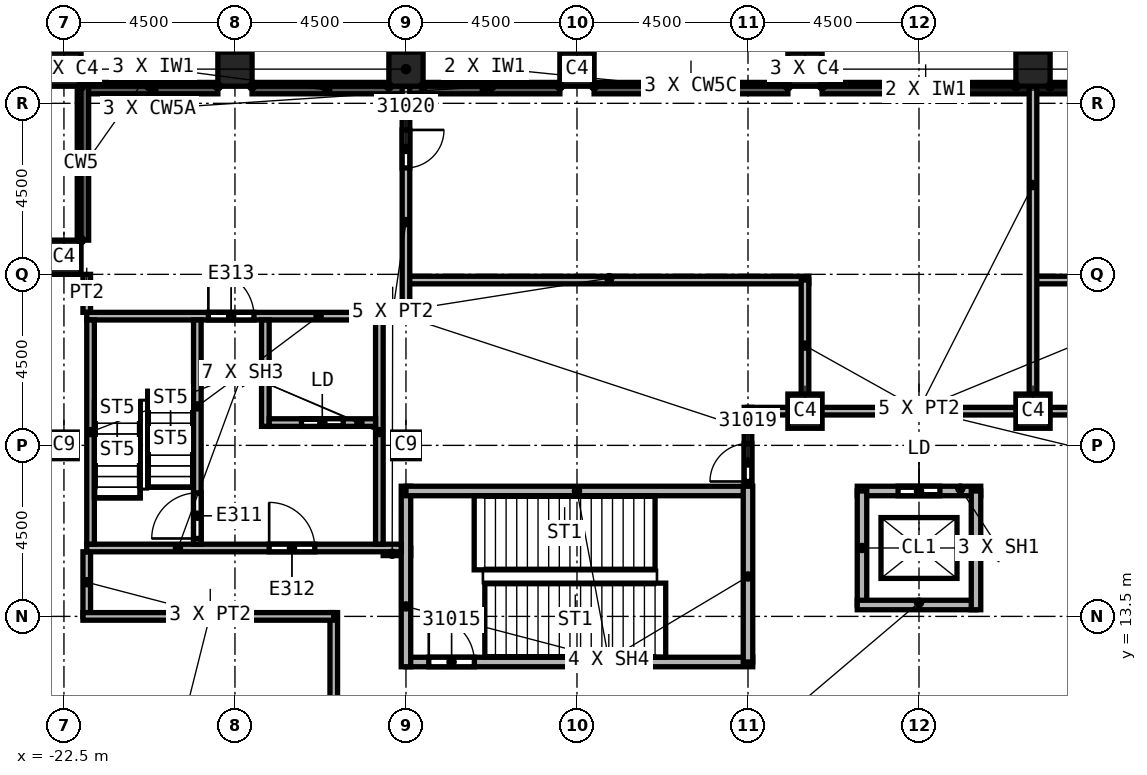
"""IFC4 building model, lengths in metres.
Left out: names, types, materials, properties, quantities, classifications, styles, units other than length and angle.
Written with IfcOpenShell. Run it as: python <this file> out.ifc"""

import sys

from ifc_helpers import new_model, si_unit, direction, frame, frame_2d, origin, origin_2d, place, context, subcontext, project, spatial, rectangle, extrude, element, fill, save


model = new_model("IFC4")
c1 = context("Model", 3, precision=1e-05, world=origin(), true_north=direction((0.0, 1.0)))
c2 = subcontext(c1, "Body", "Model", "MODEL_VIEW")
j1 = project(units=[si_unit("LENGTHUNIT", "METRE"), si_unit("PLANEANGLEUNIT", "RADIAN")], contexts=[c1])
p1 = place(None, origin())
s1 = spatial("IfcSite", under=j1, at=p1, CompositionType="ELEMENT")
p2 = place(p1, origin())
s2 = spatial("IfcBuilding", under=s1, at=p2, CompositionType="ELEMENT")
p3 = place(p2, frame((0.0, 0.0, 350.0)))
s3 = spatial("IfcBuildingStorey", under=s2, at=p3, CompositionType="ELEMENT", Elevation=350.0)
for number, where, z_axis, x_axis in (
    (1, (-13.5, 18.0, 0.0), (0.0, 0.0, 1.0), (1.0, 0.0, 0.0)),
    (2, (-22.5, 18.0, 0.0), (0.0, 0.0, 1.0), (1.0, 0.0, 0.0)),
):
    element("IfcColumn", number, at=place(p3, frame(where, z_axis=z_axis, x_axis=x_axis)), inside=s3, PredefinedType="COLUMN", context=c2, shape_type="SweptSolid", body=[
        extrude(rectangle(XDim=0.7, YDim=0.7, at=origin_2d()), origin(), (0.0, 0.0, 1.0), 5.6),
    ])
for number, where, z_axis, x_axis in (
    (3, (3.0, 27.9, 0.0), (0.0, 0.0, 1.0), (1.0, 0.0, 0.0)),
    (4, (-3.0, 27.9, 0.0), (0.0, 0.0, 1.0), (1.0, 0.0, 0.0)),
    (5, (-9.0, 27.9, 0.0), (0.0, 0.0, 1.0), (1.0, 0.0, 0.0)),
    (6, (-13.5, 27.9, 0.0), (0.0, 0.0, 1.0), (1.0, 0.0, 0.0)),
    (7, (-18.0, 27.9, 0.0), (0.0, 0.0, 1.0), (1.0, 0.0, 0.0)),
    (8, (-22.5, 27.9, 0.0), (0.0, 0.0, 1.0), (1.0, 0.0, 0.0)),
    (9, (3.0, 18.9, 0.0), (0.0, 0.0, 1.0), (1.0, 0.0, 0.0)),
    (10, (-3.0, 18.9, 0.0), (0.0, 0.0, 1.0), (1.0, 0.0, 0.0)),
    (11, (-22.5, 22.95, 0.0), (0.0, 0.0, 1.0), (1.0, 0.0, 0.0)),
):
    element("IfcColumn", number, at=place(p3, frame(where, z_axis=z_axis, x_axis=x_axis)), inside=s3, PredefinedType="COLUMN", context=c2, shape_type="SweptSolid", body=[
        extrude(rectangle(XDim=0.9, YDim=0.9, at=origin_2d()), origin(), (0.0, 0.0, 1.0), 5.6),
    ])
for number, where, z_axis, x_axis in (
    (12, (8.55, 27.4, 0.0), (0.0, 0.0, 1.0), (-1.0, 0.0, 0.0)),
    (13, (2.95, 27.4, 0.0), (0.0, 0.0, 1.0), (-1.0, 0.0, 0.0)),
):
    element("IfcWall", number, at=place(p3, frame(where, z_axis=z_axis, x_axis=x_axis)), inside=s3, PredefinedType="SOLIDWALL", context=c2, shape_type="SweptSolid", body=[
        extrude(rectangle(XDim=5.5, YDim=0.3, at=frame_2d((2.75, 0.0))), origin(), (0.0, 0.0, 1.0), 1.1),
    ])
p4 = place(p3, frame((-3.45, 27.4, 0.0), z_axis=(0.0, 0.0, 1.0), x_axis=(-1.0, 0.0, 0.0)))
e14 = element("IfcWall", 14, at=p4, inside=s3, PredefinedType="SOLIDWALL", context=c2, shape_type="SweptSolid", body=[
    extrude(rectangle(XDim=5.1, YDim=0.3, at=frame_2d((2.55, 0.0))), origin(), (0.0, 0.0, 1.0), 1.1),
])
for number, where, z_axis, x_axis in (
    (15, (-9.45, 27.4, 0.0), (0.0, 0.0, 1.0), (-1.0, 0.0, 0.0)),
    (16, (-13.55, 27.4, 0.0), (0.0, 0.0, 1.0), (-1.0, 0.0, 0.0)),
):
    element("IfcWall", number, at=place(p3, frame(where, z_axis=z_axis, x_axis=x_axis)), inside=s3, PredefinedType="SOLIDWALL", context=c2, shape_type="SweptSolid", body=[
        extrude(rectangle(XDim=4.0, YDim=0.3, at=frame_2d((2.0, 0.0))), origin(), (0.0, 0.0, 1.0), 1.1),
    ])
p5 = place(p3, frame((-18.45, 27.4, 0.0), z_axis=(0.0, 0.0, 1.0), x_axis=(-1.0, 0.0, 0.0)))
e17 = element("IfcWall", 17, at=p5, inside=s3, PredefinedType="SOLIDWALL", context=c2, shape_type="SweptSolid", body=[
    extrude(rectangle(XDim=3.6, YDim=0.3, at=frame_2d((1.8, 0.0))), origin(), (0.0, 0.0, 1.0), 1.1),
])
p6 = place(p3, frame((-22.0, 27.45, 0.0), z_axis=(0.0, 0.0, 1.0), x_axis=(0.0, -1.0, 0.0)))
e18 = element("IfcWall", 18, at=p6, inside=s3, PredefinedType="SOLIDWALL", context=c2, shape_type="SweptSolid", body=[
    extrude(rectangle(XDim=4.05, YDim=0.3, at=frame_2d((2.025, 0.0))), origin(), (0.0, 0.0, 1.0), 1.1),
])
p7 = place(p3, frame((-21.9, 13.5, 0.0), z_axis=(0.0, 0.0, 1.0), x_axis=(0.0, 1.0, 0.0)))
e19 = element("IfcWall", 19, at=p7, inside=s3, PredefinedType="PARTITIONING", context=c2, shape_type="SweptSolid", body=[
    extrude(rectangle(XDim=1.7, YDim=0.2, at=frame_2d((0.85, 0.0))), origin(), (0.0, 0.0, 1.0), 5.6),
])
p8 = place(p3, frame((-21.9, 21.5, 0.0), z_axis=(0.0, 0.0, 1.0), x_axis=(0.0, 1.0, 0.0)))
e20 = element("IfcWall", 20, at=p8, inside=s3, PredefinedType="PARTITIONING", context=c2, shape_type="SweptSolid", body=[
    extrude(rectangle(XDim=1.0, YDim=0.2, at=frame_2d((0.5, 0.0))), origin(), (0.0, 0.0, 1.0), 5.6),
])
p9 = place(p3, frame((-15.4, -27.25, 0.0), z_axis=(0.0, 0.0, 1.0), x_axis=(0.0, 1.0, 0.0)))
e21 = element("IfcWall", 21, at=p9, inside=s3, PredefinedType="PARTITIONING", context=c2, shape_type="SweptSolid", body=[
    extrude(rectangle(XDim=40.85, YDim=0.2, at=frame_2d((20.425, 0.0))), origin(), (0.0, 0.0, 1.0), 5.6),
])
p10 = place(p9, frame((29.05, 0.0, 0.0)))
e22 = element("IfcOpeningElement", 22, at=p10, cuts=e21, PredefinedType="OPENING", context=c2, shape_type="SweptSolid", body=[
    extrude(rectangle(XDim=1.0, YDim=2.1, at=frame_2d((0.5, 1.05))), frame((0.0, 0.1, 0.0), z_axis=(0.0, -1.0, 0.0), x_axis=(1.0, 0.0, 0.0)), (0.0, 0.0, 1.0), 0.2),
])
p11 = place(p9, frame((33.7, 0.0, 0.0)))
e23 = element("IfcOpeningElement", 23, at=p11, cuts=e21, PredefinedType="OPENING", context=c2, shape_type="SweptSolid", body=[
    extrude(rectangle(XDim=1.0, YDim=2.1, at=frame_2d((0.5, 1.05))), frame((0.0, 0.1, 0.0), z_axis=(0.0, -1.0, 0.0), x_axis=(1.0, 0.0, 0.0)), (0.0, 0.0, 1.0), 0.2),
])
p12 = place(p9, frame((1.3, 0.0, 0.0)))
e24 = element("IfcOpeningElement", 24, at=p12, cuts=e21, PredefinedType="OPENING", context=c2, shape_type="SweptSolid", body=[
    extrude(rectangle(XDim=1.0, YDim=2.1, at=frame_2d((0.5, 1.05))), frame((0.0, 0.1, 0.0), z_axis=(0.0, -1.0, 0.0), x_axis=(1.0, 0.0, 0.0)), (0.0, 0.0, 1.0), 0.2),
])
p13 = place(p9, frame((7.15, 0.0, 0.0)))
e25 = element("IfcOpeningElement", 25, at=p13, cuts=e21, PredefinedType="OPENING", context=c2, shape_type="SweptSolid", body=[
    extrude(rectangle(XDim=1.0, YDim=2.1, at=frame_2d((0.5, 1.05))), frame((0.0, 0.1, 0.0), z_axis=(0.0, -1.0, 0.0), x_axis=(1.0, 0.0, 0.0)), (0.0, 0.0, 1.0), 0.2),
])
p14 = place(p9, frame((17.05, 0.0, 0.0)))
e26 = element("IfcOpeningElement", 26, at=p14, cuts=e21, PredefinedType="OPENING", context=c2, shape_type="SweptSolid", body=[
    extrude(rectangle(XDim=1.0, YDim=2.1, at=frame_2d((0.5, 1.05))), frame((0.0, 0.1, 0.0), z_axis=(0.0, -1.0, 0.0), x_axis=(1.0, 0.0, 0.0)), (0.0, 0.0, 1.0), 0.2),
])
p15 = place(p9, frame((24.1, 0.0, 0.0)))
e27 = element("IfcOpeningElement", 27, at=p15, cuts=e21, PredefinedType="OPENING", context=c2, shape_type="SweptSolid", body=[
    extrude(rectangle(XDim=1.0, YDim=2.1, at=frame_2d((0.5, 1.05))), frame((0.0, 0.1, 0.0), z_axis=(0.0, -1.0, 0.0), x_axis=(1.0, 0.0, 0.0)), (0.0, 0.0, 1.0), 0.2),
])
p16 = place(p3, frame((-15.4, 13.5, 0.0), z_axis=(0.0, 0.0, 1.0), x_axis=(-1.0, 0.0, 0.0)))
e28 = element("IfcWall", 28, at=p16, inside=s3, PredefinedType="PARTITIONING", context=c2, shape_type="SweptSolid", body=[
    extrude(rectangle(XDim=6.6, YDim=0.2, at=frame_2d((3.3, 0.0))), origin(), (0.0, 0.0, 1.0), 5.6),
])
p17 = place(p3, frame((-14.1, 15.2, 0.0), z_axis=(0.0, 0.0, 1.0), x_axis=(1.0, 0.0, 0.0)))
e29 = element("IfcWall", 29, at=p17, inside=s3, PredefinedType="PARTITIONING", context=c2, shape_type="SweptSolid", body=[
    extrude(rectangle(XDim=0.725, YDim=0.2, at=frame_2d((0.363, 0.0))), origin(), (0.0, 0.0, 1.0), 5.6),
])
p18 = place(p3, frame((-13.5, 21.5, 0.0), z_axis=(0.0, 0.0, 1.0), x_axis=(-1.0, 0.0, 0.0)))
e30 = element("IfcWall", 30, at=p18, inside=s3, PredefinedType="PARTITIONING", context=c2, shape_type="SweptSolid", body=[
    extrude(rectangle(XDim=0.6, YDim=0.2, at=frame_2d((0.3, 0.0))), origin(), (0.0, 0.0, 1.0), 5.6),
])
p19 = place(p3, frame((-13.5, 22.35, 0.0), z_axis=(0.0, 0.0, 1.0), x_axis=(1.0, 0.0, 0.0)))
e31 = element("IfcWall", 31, at=p19, inside=s3, PredefinedType="PARTITIONING", context=c2, shape_type="SweptSolid", body=[
    extrude(rectangle(XDim=10.6, YDim=0.2, at=frame_2d((5.3, 0.0))), origin(), (0.0, 0.0, 1.0), 5.6),
])
p20 = place(p3, frame((-13.5, 27.45, 0.0), z_axis=(0.0, 0.0, 1.0), x_axis=(0.0, -1.0, 0.0)))
e32 = element("IfcWall", 32, at=p20, inside=s3, PredefinedType="PARTITIONING", context=c2, shape_type="SweptSolid", body=[
    extrude(rectangle(XDim=6.05, YDim=0.2, at=frame_2d((3.025, 0.0))), origin(), (0.0, 0.0, 1.0), 5.6),
])
p21 = place(p20, frame((1.15, 0.0, 0.0)))
e33 = element("IfcOpeningElement", 33, at=p21, cuts=e32, PredefinedType="OPENING", context=c2, shape_type="SweptSolid", body=[
    extrude(rectangle(XDim=1.0, YDim=2.1, at=frame_2d((0.5, 1.05))), frame((0.0, 0.1, 0.0), z_axis=(0.0, -1.0, 0.0), x_axis=(1.0, 0.0, 0.0)), (0.0, 0.0, 1.0), 0.2),
])
p22 = place(p3, frame((-4.5, 16.8, 0.0), z_axis=(0.0, 0.0, 1.0), x_axis=(0.0, 1.0, 0.0)))
e34 = element("IfcWall", 34, at=p22, inside=s3, PredefinedType="PARTITIONING", context=c2, shape_type="SweptSolid", body=[
    extrude(rectangle(XDim=2.2, YDim=0.2, at=frame_2d((1.1, 0.0))), origin(), (0.0, 0.0, 1.0), 5.6),
])
p23 = place(p22, frame((0.25, 0.0, 0.0)))
e35 = element("IfcOpeningElement", 35, at=p23, cuts=e34, PredefinedType="OPENING", context=c2, shape_type="SweptSolid", body=[
    extrude(rectangle(XDim=1.0, YDim=2.1, at=frame_2d((0.5, 1.05))), frame((0.0, 0.1, 0.0), z_axis=(0.0, -1.0, 0.0), x_axis=(1.0, 0.0, 0.0)), (0.0, 0.0, 1.0), 0.2),
])
p24 = place(p3, frame((-4.5, 18.9, 0.0), z_axis=(0.0, 0.0, 1.0), x_axis=(1.0, 0.0, 0.0)))
e36 = element("IfcWall", 36, at=p24, inside=s3, PredefinedType="PARTITIONING", context=c2, shape_type="SweptSolid", body=[
    extrude(rectangle(XDim=9.1, YDim=0.2, at=frame_2d((4.55, 0.0))), origin(), (0.0, 0.0, 1.0), 5.6),
])
p25 = place(p3, frame((-3.0, 22.35, 0.0), z_axis=(0.0, 0.0, 1.0), x_axis=(0.0, -1.0, 0.0)))
e37 = element("IfcWall", 37, at=p25, inside=s3, PredefinedType="PARTITIONING", context=c2, shape_type="SweptSolid", body=[
    extrude(rectangle(XDim=3.45, YDim=0.2, at=frame_2d((1.725, 0.0))), origin(), (0.0, 0.0, 1.0), 5.6),
])
p26 = place(p3, frame((3.0, 22.35, 0.0), z_axis=(0.0, 0.0, 1.0), x_axis=(1.0, 0.0, 0.0)))
e38 = element("IfcWall", 38, at=p26, inside=s3, PredefinedType="PARTITIONING", context=c2, shape_type="SweptSolid", body=[
    extrude(rectangle(XDim=10.5, YDim=0.2, at=frame_2d((5.25, 0.0))), origin(), (0.0, 0.0, 1.0), 5.6),
])
p27 = place(p3, frame((3.0, 27.45, 0.0), z_axis=(0.0, 0.0, 1.0), x_axis=(0.0, -1.0, 0.0)))
e39 = element("IfcWall", 39, at=p27, inside=s3, PredefinedType="PARTITIONING", context=c2, shape_type="SweptSolid", body=[
    extrude(rectangle(XDim=8.55, YDim=0.2, at=frame_2d((4.275, 0.0))), origin(), (0.0, 0.0, 1.0), 5.6),
])
p28 = place(p3, frame((-1.625, 16.8, 0.0), z_axis=(0.0, 0.0, 1.0), x_axis=(1.0, 0.0, 0.0)))
e40 = element("IfcWall", 40, at=p28, inside=s3, PredefinedType="SOLIDWALL", context=c2, shape_type="SweptSolid", body=[
    extrude(rectangle(XDim=3.25, YDim=0.25, at=frame_2d((1.625, 0.0))), origin(), (0.0, 0.0, 1.0), 5.6),
])
p29 = place(p28, frame((1.075, 0.0, 0.0)))
e41 = element("IfcOpeningElement", 41, at=p29, cuts=e40, PredefinedType="OPENING", context=c2, shape_type="SweptSolid", body=[
    extrude(rectangle(XDim=1.1, YDim=2.1, at=frame_2d((0.55, 1.05))), frame((0.0, 0.125, 0.0), z_axis=(0.0, -1.0, 0.0), x_axis=(1.0, 0.0, 0.0)), (0.0, 0.0, 1.0), 0.25),
])
p30 = place(p3, frame((-1.5, 13.8, 0.0), z_axis=(0.0, 0.0, 1.0), x_axis=(0.0, 1.0, 0.0)))
e42 = element("IfcWall", 42, at=p30, inside=s3, PredefinedType="SOLIDWALL", context=c2, shape_type="SweptSolid", body=[
    extrude(rectangle(XDim=3.0, YDim=0.25, at=frame_2d((1.5, 0.0))), origin(), (0.0, 0.0, 1.0), 5.6),
])
for number, where, z_axis, x_axis in (
    (43, (1.5, 13.8, 0.0), (0.0, 0.0, 1.0), (-1.0, 0.0, 0.0)),
    (44, (1.5, 16.8, 0.0), (0.0, 0.0, 1.0), (0.0, -1.0, 0.0)),
):
    element("IfcWall", number, at=place(p3, frame(where, z_axis=z_axis, x_axis=x_axis)), inside=s3, PredefinedType="SOLIDWALL", context=c2, shape_type="SweptSolid", body=[
        extrude(rectangle(XDim=3.125, YDim=0.25, at=frame_2d((1.562, 0.0))), origin(), (0.0, 0.0, 1.0), 5.6),
    ])
p31 = place(p3, frame((-13.5, 12.3, 0.0), z_axis=(0.0, 0.0, 1.0), x_axis=(1.0, 0.0, 0.0)))
e45 = element("IfcWall", 45, at=p31, inside=s3, PredefinedType="SOLIDWALL", context=c2, shape_type="SweptSolid", body=[
    extrude(rectangle(XDim=9.125, YDim=0.25, at=frame_2d((4.562, 0.0))), origin(), (0.0, 0.0, 1.0), 5.6),
])
p32 = place(p31, frame((0.6, 0.0, 0.0)))
e46 = element("IfcOpeningElement", 46, at=p32, cuts=e45, PredefinedType="OPENING", context=c2, shape_type="SweptSolid", body=[
    extrude(rectangle(XDim=1.2, YDim=2.1, at=frame_2d((0.6, 1.05))), frame((0.0, 0.125, 0.0), z_axis=(0.0, -1.0, 0.0), x_axis=(1.0, 0.0, 0.0)), (0.0, 0.0, 1.0), 0.25),
])
p33 = place(p3, frame((-13.5, 12.175, 0.0), z_axis=(0.0, 0.0, 1.0), x_axis=(0.0, 1.0, 0.0)))
e47 = element("IfcWall", 47, at=p33, inside=s3, PredefinedType="SOLIDWALL", context=c2, shape_type="SweptSolid", body=[
    extrude(rectangle(XDim=4.75, YDim=0.25, at=frame_2d((2.375, 0.0))), origin(), (0.0, 0.0, 1.0), 5.6),
])
p34 = place(p3, frame((-13.5, 16.8, 0.0), z_axis=(0.0, 0.0, 1.0), x_axis=(1.0, 0.0, 0.0)))
e48 = element("IfcWall", 48, at=p34, inside=s3, PredefinedType="SOLIDWALL", context=c2, shape_type="SweptSolid", body=[
    extrude(rectangle(XDim=9.1, YDim=0.25, at=frame_2d((4.55, 0.0))), origin(), (0.0, 0.0, 1.0), 5.6),
])
p35 = place(p3, frame((-4.5, 16.925, 0.0), z_axis=(0.0, 0.0, 1.0), x_axis=(0.0, -1.0, 0.0)))
e49 = element("IfcWall", 49, at=p35, inside=s3, PredefinedType="SOLIDWALL", context=c2, shape_type="SweptSolid", body=[
    extrude(rectangle(XDim=4.625, YDim=0.25, at=frame_2d((2.312, 0.0))), origin(), (0.0, 0.0, 1.0), 5.6),
])
p36 = place(p3, frame((-21.9, 15.3, 0.0), z_axis=(0.0, 0.0, 1.0), x_axis=(1.0, 0.0, 0.0)))
e50 = element("IfcWall", 50, at=p36, inside=s3, PredefinedType="SOLIDWALL", context=c2, shape_type="SweptSolid", body=[
    extrude(rectangle(XDim=8.275, YDim=0.2, at=frame_2d((4.137, 0.0))), origin(), (0.0, 0.0, 1.0), 5.6),
])
p37 = place(p36, frame((4.8, 0.0, 0.0)))
e51 = element("IfcOpeningElement", 51, at=p37, cuts=e50, PredefinedType="OPENING", context=c2, shape_type="SweptSolid", body=[
    extrude(rectangle(XDim=1.2, YDim=2.1, at=frame_2d((0.6, 1.05))), frame((0.0, 0.1, 0.0), z_axis=(0.0, -1.0, 0.0), x_axis=(1.0, 0.0, 0.0)), (0.0, 0.0, 1.0), 0.2),
])
p38 = place(p3, frame((-21.9, 21.4, 0.0), z_axis=(0.0, 0.0, 1.0), x_axis=(1.0, 0.0, 0.0)))
e52 = element("IfcWall", 52, at=p38, inside=s3, PredefinedType="SOLIDWALL", context=c2, shape_type="SweptSolid", body=[
    extrude(rectangle(XDim=7.8, YDim=0.2, at=frame_2d((3.9, 0.0))), origin(), (0.0, 0.0, 1.0), 5.6),
])
p39 = place(p38, frame((3.2, 0.0, 0.0)))
e53 = element("IfcOpeningElement", 53, at=p39, cuts=e52, PredefinedType="OPENING", context=c2, shape_type="SweptSolid", body=[
    extrude(rectangle(XDim=1.2, YDim=2.1, at=frame_2d((0.6, 1.05))), frame((0.0, 0.1, 0.0), z_axis=(0.0, -1.0, 0.0), x_axis=(1.0, 0.0, 0.0)), (0.0, 0.0, 1.0), 0.2),
])
for number, where, z_axis, x_axis in (
    (54, (-21.8, 15.4, 0.0), (0.0, 0.0, 1.0), (0.0, 1.0, 0.0)),
    (55, (-14.2, 15.4, 0.0), (0.0, 0.0, 1.0), (0.0, 1.0, 0.0)),
):
    element("IfcWall", number, at=place(p3, frame(where, z_axis=z_axis, x_axis=x_axis)), inside=s3, PredefinedType="SOLIDWALL", context=c2, shape_type="SweptSolid", body=[
        extrude(rectangle(XDim=5.9, YDim=0.2, at=frame_2d((2.95, 0.0))), origin(), (0.0, 0.0, 1.0), 5.6),
    ])
p40 = place(p3, frame((-18.99, 15.4, 0.0), z_axis=(0.0, 0.0, 1.0), x_axis=(0.0, 1.0, 0.0)))
e56 = element("IfcWall", 56, at=p40, inside=s3, PredefinedType="SOLIDWALL", context=c2, shape_type="SweptSolid", body=[
    extrude(rectangle(XDim=5.9, YDim=0.2, at=frame_2d((2.95, 0.0))), origin(), (0.0, 0.0, 1.0), 5.6),
])
p41 = place(p40, frame((0.15, 0.0, 0.0)))
e57 = element("IfcOpeningElement", 57, at=p41, cuts=e56, PredefinedType="OPENING", context=c2, shape_type="SweptSolid", body=[
    extrude(rectangle(XDim=1.2, YDim=2.1, at=frame_2d((0.6, 1.05))), frame((0.0, 0.1, 0.0), z_axis=(0.0, -1.0, 0.0), x_axis=(1.0, 0.0, 0.0)), (0.0, 0.0, 1.0), 0.2),
])
p42 = place(p3, frame((-17.2, 18.5, 0.0), z_axis=(0.0, 0.0, 1.0), x_axis=(0.0, 1.0, 0.0)))
e58 = element("IfcWall", 58, at=p42, inside=s3, PredefinedType="SOLIDWALL", context=c2, shape_type="SweptSolid", body=[
    extrude(rectangle(XDim=2.8, YDim=0.2, at=frame_2d((1.4, 0.0))), origin(), (0.0, 0.0, 1.0), 5.6),
])
p43 = place(p3, frame((-17.1, 18.6, 0.0), z_axis=(0.0, 0.0, 1.0), x_axis=(1.0, 0.0, 0.0)))
e59 = element("IfcWall", 59, at=p43, inside=s3, PredefinedType="SOLIDWALL", context=c2, shape_type="SweptSolid", body=[
    extrude(rectangle(XDim=2.8, YDim=0.2, at=frame_2d((1.4, 0.0))), origin(), (0.0, 0.0, 1.0), 5.6),
])
p44 = place(p43, frame((0.85, 0.0, 0.0)))
e60 = element("IfcOpeningElement", 60, at=p44, cuts=e59, PredefinedType="OPENING", context=c2, shape_type="SweptSolid", body=[
    extrude(rectangle(XDim=1.1, YDim=2.1, at=frame_2d((0.55, 1.05))), frame((0.0, 0.1, 0.0), z_axis=(0.0, -1.0, 0.0), x_axis=(1.0, 0.0, 0.0)), (0.0, 0.0, 1.0), 0.2),
])
p45 = place(p32, origin())
e61 = element("IfcDoor", 61, at=p45, inside=s3, OperationType="SINGLE_SWING_RIGHT", PredefinedType="DOOR", context=c2, shape_type="SweptSolid", body=[
    extrude(rectangle(XDim=1.2, YDim=2.1, at=frame_2d((0.6, 1.05))), frame((0.0, 0.025, 0.0), z_axis=(0.0, -1.0, 0.0), x_axis=(1.0, 0.0, 0.0)), (0.0, 0.0, 1.0), 0.05),
])
fill(e46, e61)
p46 = place(p23, origin())
e62 = element("IfcDoor", 62, at=p46, inside=s3, OperationType="SINGLE_SWING_RIGHT", PredefinedType="DOOR", context=c2, shape_type="SweptSolid", body=[
    extrude(rectangle(XDim=1.0, YDim=2.1, at=frame_2d((0.5, 1.05))), frame((0.0, 0.025, 0.0), z_axis=(0.0, -1.0, 0.0), x_axis=(1.0, 0.0, 0.0)), (0.0, 0.0, 1.0), 0.05),
])
fill(e35, e62)
p47 = place(p21, origin())
e63 = element("IfcDoor", 63, at=p47, inside=s3, OperationType="SINGLE_SWING_LEFT", PredefinedType="DOOR", context=c2, shape_type="SweptSolid", body=[
    extrude(rectangle(XDim=1.0, YDim=2.1, at=frame_2d((0.5, 1.05))), frame((0.0, 0.025, 0.0), z_axis=(0.0, -1.0, 0.0), x_axis=(1.0, 0.0, 0.0)), (0.0, 0.0, 1.0), 0.05),
])
fill(e33, e63)
p48 = place(p29, origin())
e64 = element("IfcDoor", 64, at=p48, inside=s3, OperationType="SLIDING_TO_LEFT", PredefinedType="DOOR", context=c2, shape_type="SweptSolid", body=[
    extrude(rectangle(XDim=1.1, YDim=2.1, at=frame_2d((0.55, 1.05))), frame((0.0, 0.025, 0.0), z_axis=(0.0, -1.0, 0.0), x_axis=(1.0, 0.0, 0.0)), (0.0, 0.0, 1.0), 0.05),
])
fill(e41, e64)
p49 = place(p41, origin())
e65 = element("IfcDoor", 65, at=p49, inside=s3, OperationType="SINGLE_SWING_LEFT", PredefinedType="DOOR", context=c2, shape_type="SweptSolid", body=[
    extrude(rectangle(XDim=1.2, YDim=2.1, at=frame_2d((0.6, 1.05))), frame((0.0, 0.025, 0.0), z_axis=(0.0, -1.0, 0.0), x_axis=(1.0, 0.0, 0.0)), (0.0, 0.0, 1.0), 0.05),
])
fill(e57, e65)
p50 = place(p44, origin())
e66 = element("IfcDoor", 66, at=p50, inside=s3, OperationType="SLIDING_TO_LEFT", PredefinedType="DOOR", context=c2, shape_type="SweptSolid", body=[
    extrude(rectangle(XDim=1.1, YDim=2.1, at=frame_2d((0.55, 1.05))), frame((0.0, 0.025, 0.0), z_axis=(0.0, -1.0, 0.0), x_axis=(1.0, 0.0, 0.0)), (0.0, 0.0, 1.0), 0.05),
])
fill(e60, e66)
p51 = place(p37, origin())
e67 = element("IfcDoor", 67, at=p51, inside=s3, OperationType="SINGLE_SWING_RIGHT", PredefinedType="DOOR", context=c2, shape_type="SweptSolid", body=[
    extrude(rectangle(XDim=1.2, YDim=2.1, at=frame_2d((0.6, 1.05))), frame((0.0, 0.025, 0.0), z_axis=(0.0, -1.0, 0.0), x_axis=(1.0, 0.0, 0.0)), (0.0, 0.0, 1.0), 0.05),
])
fill(e51, e67)
p52 = place(p39, origin())
e68 = element("IfcDoor", 68, at=p52, inside=s3, OperationType="SINGLE_SWING_LEFT", PredefinedType="DOOR", context=c2, shape_type="SweptSolid", body=[
    extrude(rectangle(XDim=1.2, YDim=2.1, at=frame_2d((0.6, 1.05))), frame((0.0, 0.025, 0.0), z_axis=(0.0, -1.0, 0.0), x_axis=(1.0, 0.0, 0.0)), (0.0, 0.0, 1.0), 0.05),
])
fill(e53, e68)
save(model, sys.argv[1])
